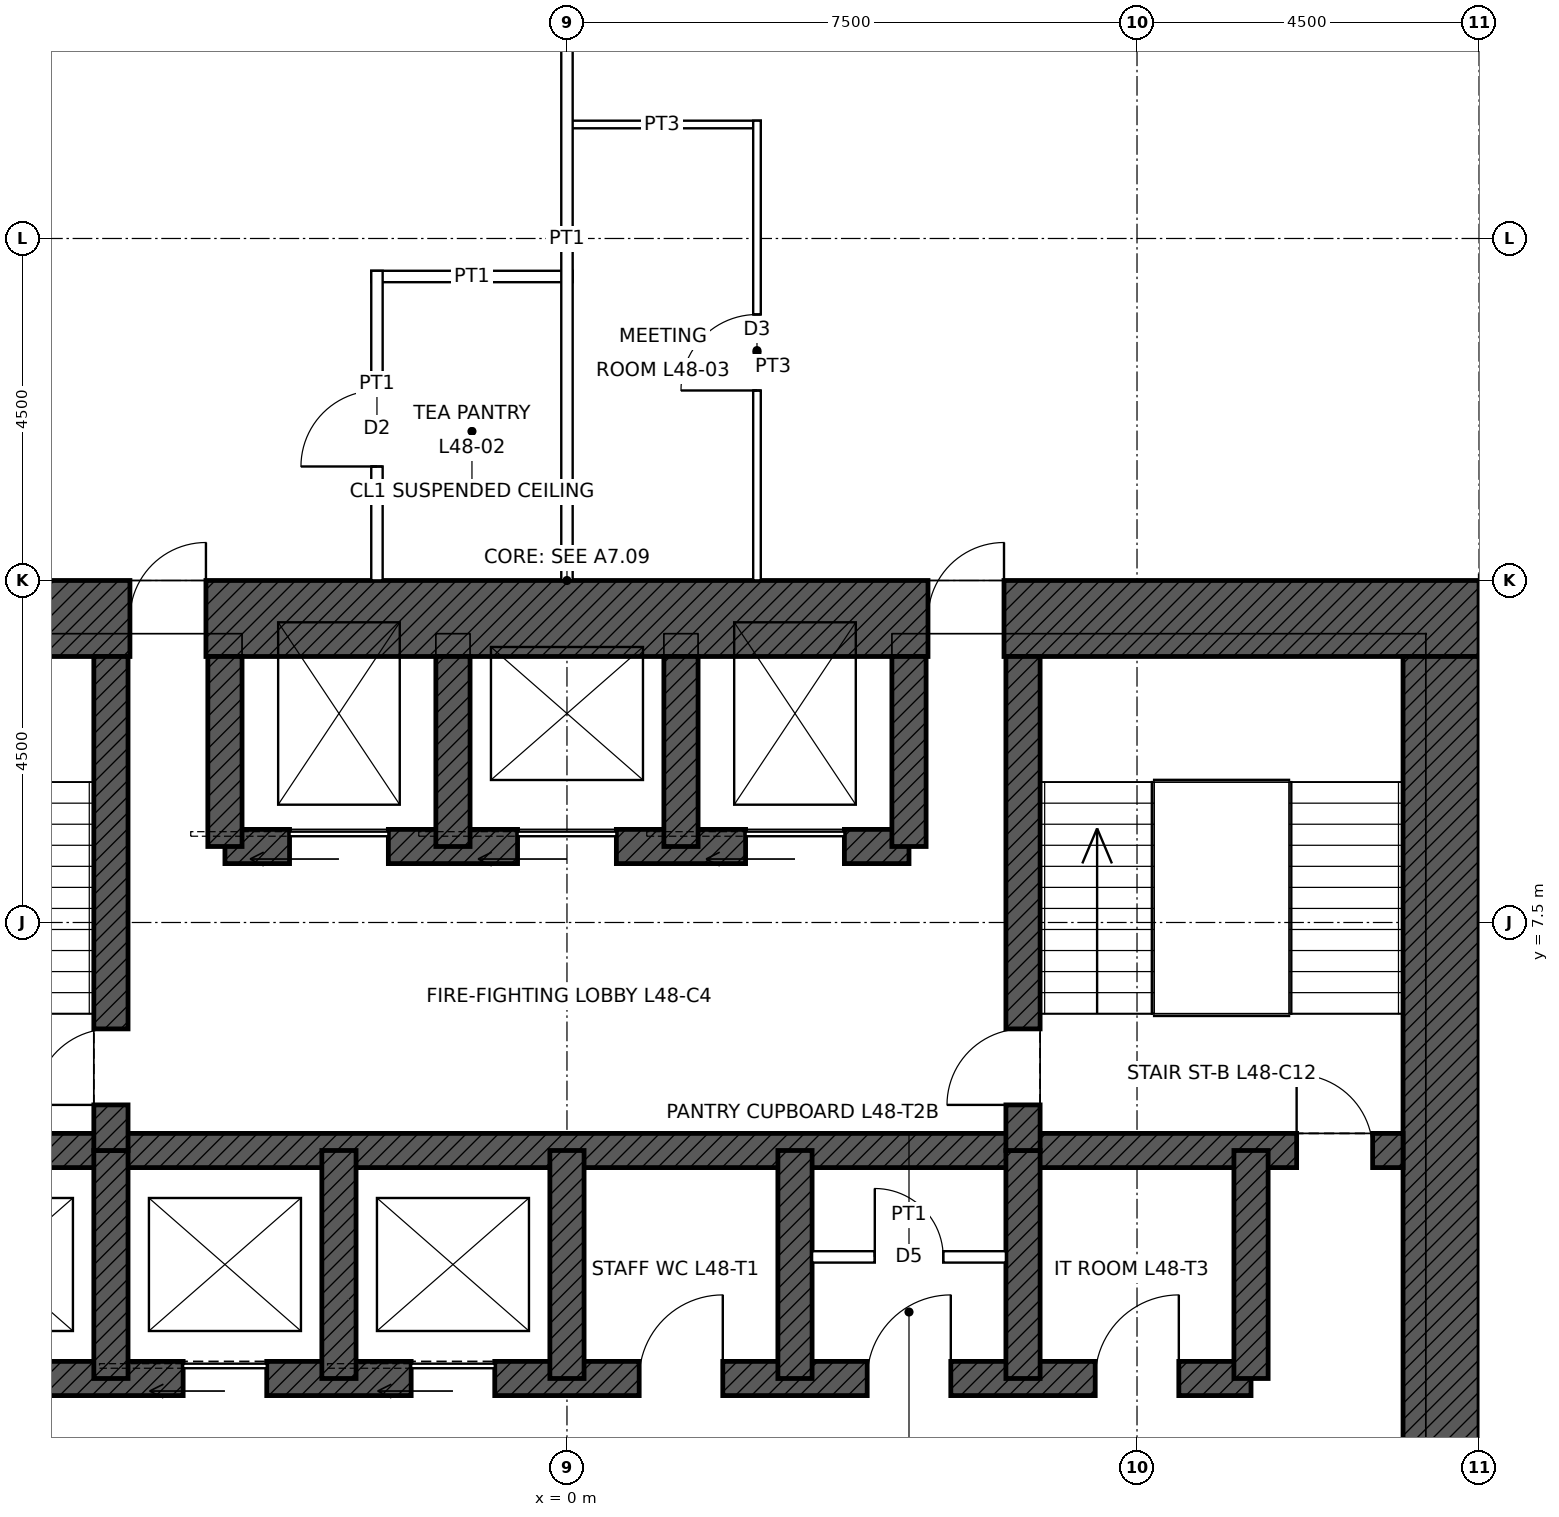
"""IFC4 building model, lengths in metres.
Left out: names, types, materials, properties, quantities, classifications, styles, units other than length and angle.
Written with IfcOpenShell. Run it as: python <this file> out.ifc"""

import sys

from ifc_helpers import new_model, si_unit, direction, frame, frame_2d, origin, place, context, subcontext, project, spatial, rectangle, extrude, element, fill, save


model = new_model("IFC4")
c1 = context("Model", 3, precision=1e-05, world=origin(), true_north=direction((0.0, 1.0)))
c2 = subcontext(c1, "Body", "Model", "MODEL_VIEW")
j1 = project(units=[si_unit("LENGTHUNIT", "METRE"), si_unit("PLANEANGLEUNIT", "RADIAN")], contexts=[c1])
p1 = place(None, origin())
s1 = spatial("IfcSite", under=j1, at=p1, CompositionType="ELEMENT")
p2 = place(p1, origin())
s2 = spatial("IfcBuilding", under=s1, at=p2, CompositionType="ELEMENT")
p3 = place(p2, frame((0.0, 0.0, 225.9)))
s3 = spatial("IfcBuildingStorey", under=s2, at=p3, CompositionType="ELEMENT", Elevation=225.9)
p4 = place(p3, frame((-12.0, 11.5, 0.0), z_axis=(0.0, 0.0, 1.0), x_axis=(1.0, 0.0, 0.0)))
e1 = element("IfcWall", 1, at=p4, inside=s3, PredefinedType="SHEAR", context=c2, shape_type="SweptSolid", body=[
    extrude(rectangle(XDim=24.0, YDim=1.0, at=frame_2d((12.0, 0.0))), origin(), (0.0, 0.0, 1.0), 4.0),
])
p5 = place(p4, frame((6.25, 0.0, 0.0)))
e2 = element("IfcOpeningElement", 2, at=p5, cuts=e1, PredefinedType="OPENING", context=c2, shape_type="SweptSolid", body=[
    extrude(rectangle(XDim=1.0, YDim=2.4, at=frame_2d((0.5, 1.2))), frame((0.0, 0.51, 0.0), z_axis=(0.0, -1.0, 0.0), x_axis=(1.0, 0.0, 0.0)), (0.0, 0.0, 1.0), 1.02),
])
p6 = place(p4, frame((16.75, 0.0, 0.0)))
e3 = element("IfcOpeningElement", 3, at=p6, cuts=e1, PredefinedType="OPENING", context=c2, shape_type="SweptSolid", body=[
    extrude(rectangle(XDim=1.0, YDim=2.4, at=frame_2d((0.5, 1.2))), frame((0.0, 0.51, 0.0), z_axis=(0.0, -1.0, 0.0), x_axis=(1.0, 0.0, 0.0)), (0.0, 0.0, 1.0), 1.02),
])
p7 = place(p3, frame((11.5, 11.0, 0.0), z_axis=(0.0, 0.0, 1.0), x_axis=(0.0, -1.0, 0.0)))
e4 = element("IfcWall", 4, at=p7, inside=s3, PredefinedType="SHEAR", context=c2, shape_type="SweptSolid", body=[
    extrude(rectangle(XDim=22.0, YDim=1.0, at=frame_2d((11.0, 0.0))), origin(), (0.0, 0.0, 1.0), 4.0),
])
p8 = place(p7, frame((10.5, 0.0, 0.0)))
e5 = element("IfcOpeningElement", 5, at=p8, cuts=e4, PredefinedType="OPENING", context=c2, shape_type="SweptSolid", body=[
    extrude(rectangle(XDim=1.0, YDim=2.4, at=frame_2d((0.5, 1.2))), frame((0.0, 0.51, 0.0), z_axis=(0.0, -1.0, 0.0), x_axis=(1.0, 0.0, 0.0)), (0.0, 0.0, 1.0), 1.02),
])
p9 = place(p3, frame((-11.0, 4.5, 0.0), z_axis=(0.0, 0.0, 1.0), x_axis=(1.0, 0.0, 0.0)))
e6 = element("IfcWall", 6, at=p9, inside=s3, PredefinedType="SHEAR", context=c2, shape_type="SweptSolid", body=[
    extrude(rectangle(XDim=22.0, YDim=0.45, at=frame_2d((11.0, 0.0))), origin(), (0.0, 0.0, 1.0), 4.0),
])
p10 = place(p9, frame((0.4, 0.0, 0.0)))
e7 = element("IfcOpeningElement", 7, at=p10, cuts=e6, PredefinedType="OPENING", context=c2, shape_type="SweptSolid", body=[
    extrude(rectangle(XDim=1.0, YDim=2.1, at=frame_2d((0.5, 1.05))), frame((0.0, 0.235, 0.0), z_axis=(0.0, -1.0, 0.0), x_axis=(1.0, 0.0, 0.0)), (0.0, 0.0, 1.0), 0.47),
])
p11 = place(p9, frame((20.6, 0.0, 0.0)))
e8 = element("IfcOpeningElement", 8, at=p11, cuts=e6, PredefinedType="OPENING", context=c2, shape_type="SweptSolid", body=[
    extrude(rectangle(XDim=1.0, YDim=2.1, at=frame_2d((0.5, 1.05))), frame((0.0, 0.235, 0.0), z_axis=(0.0, -1.0, 0.0), x_axis=(1.0, 0.0, 0.0)), (0.0, 0.0, 1.0), 0.47),
])
p12 = place(p3, frame((-9.0, 1.5, 0.0), z_axis=(0.0, 0.0, 1.0), x_axis=(1.0, 0.0, 0.0)))
e9 = element("IfcWall", 9, at=p12, inside=s3, PredefinedType="SHEAR", context=c2, shape_type="SweptSolid", body=[
    extrude(rectangle(XDim=18.0, YDim=0.45, at=frame_2d((9.0, 0.0))), origin(), (0.0, 0.0, 1.0), 4.0),
])
p13 = place(p12, frame((0.95, 0.0, 0.0)))
e10 = element("IfcOpeningElement", 10, at=p13, cuts=e9, PredefinedType="OPENING", context=c2, shape_type="SweptSolid", body=[
    extrude(rectangle(XDim=1.1, YDim=2.1, at=frame_2d((0.55, 1.05))), frame((0.0, 0.235, 0.0), z_axis=(0.0, -1.0, 0.0), x_axis=(1.0, 0.0, 0.0)), (0.0, 0.0, 1.0), 0.47),
])
p14 = place(p12, frame((3.95, 0.0, 0.0)))
e11 = element("IfcOpeningElement", 11, at=p14, cuts=e9, PredefinedType="OPENING", context=c2, shape_type="SweptSolid", body=[
    extrude(rectangle(XDim=1.1, YDim=2.1, at=frame_2d((0.55, 1.05))), frame((0.0, 0.235, 0.0), z_axis=(0.0, -1.0, 0.0), x_axis=(1.0, 0.0, 0.0)), (0.0, 0.0, 1.0), 0.47),
])
p15 = place(p12, frame((6.95, 0.0, 0.0)))
e12 = element("IfcOpeningElement", 12, at=p15, cuts=e9, PredefinedType="OPENING", context=c2, shape_type="SweptSolid", body=[
    extrude(rectangle(XDim=1.1, YDim=2.1, at=frame_2d((0.55, 1.05))), frame((0.0, 0.235, 0.0), z_axis=(0.0, -1.0, 0.0), x_axis=(1.0, 0.0, 0.0)), (0.0, 0.0, 1.0), 0.47),
])
p16 = place(p12, frame((9.95, 0.0, 0.0)))
e13 = element("IfcOpeningElement", 13, at=p16, cuts=e9, PredefinedType="OPENING", context=c2, shape_type="SweptSolid", body=[
    extrude(rectangle(XDim=1.1, YDim=2.1, at=frame_2d((0.55, 1.05))), frame((0.0, 0.235, 0.0), z_axis=(0.0, -1.0, 0.0), x_axis=(1.0, 0.0, 0.0)), (0.0, 0.0, 1.0), 0.47),
])
p17 = place(p12, frame((12.95, 0.0, 0.0)))
e14 = element("IfcOpeningElement", 14, at=p17, cuts=e9, PredefinedType="OPENING", context=c2, shape_type="SweptSolid", body=[
    extrude(rectangle(XDim=1.1, YDim=2.1, at=frame_2d((0.55, 1.05))), frame((0.0, 0.235, 0.0), z_axis=(0.0, -1.0, 0.0), x_axis=(1.0, 0.0, 0.0)), (0.0, 0.0, 1.0), 0.47),
])
p18 = place(p12, frame((15.95, 0.0, 0.0)))
e15 = element("IfcOpeningElement", 15, at=p18, cuts=e9, PredefinedType="OPENING", context=c2, shape_type="SweptSolid", body=[
    extrude(rectangle(XDim=1.1, YDim=2.1, at=frame_2d((0.55, 1.05))), frame((0.0, 0.235, 0.0), z_axis=(0.0, -1.0, 0.0), x_axis=(1.0, 0.0, 0.0)), (0.0, 0.0, 1.0), 0.47),
])
p19 = place(p3, frame((-4.5, 8.5, 0.0), z_axis=(0.0, 0.0, 1.0), x_axis=(1.0, 0.0, 0.0)))
e16 = element("IfcWall", 16, at=p19, inside=s3, PredefinedType="SHEAR", context=c2, shape_type="SweptSolid", body=[
    extrude(rectangle(XDim=9.0, YDim=0.45, at=frame_2d((4.5, 0.0))), origin(), (0.0, 0.0, 1.0), 4.0),
])
p20 = place(p19, frame((0.85, 0.0, 0.0)))
e17 = element("IfcOpeningElement", 17, at=p20, cuts=e16, PredefinedType="OPENING", context=c2, shape_type="SweptSolid", body=[
    extrude(rectangle(XDim=1.3, YDim=2.4, at=frame_2d((0.65, 1.2))), frame((0.0, 0.235, 0.0), z_axis=(0.0, -1.0, 0.0), x_axis=(1.0, 0.0, 0.0)), (0.0, 0.0, 1.0), 0.47),
])
p21 = place(p19, frame((6.85, 0.0, 0.0)))
e18 = element("IfcOpeningElement", 18, at=p21, cuts=e16, PredefinedType="OPENING", context=c2, shape_type="SweptSolid", body=[
    extrude(rectangle(XDim=1.3, YDim=2.4, at=frame_2d((0.65, 1.2))), frame((0.0, 0.235, 0.0), z_axis=(0.0, -1.0, 0.0), x_axis=(1.0, 0.0, 0.0)), (0.0, 0.0, 1.0), 0.47),
])
p22 = place(p19, frame((3.85, 0.0, 0.0)))
e19 = element("IfcOpeningElement", 19, at=p22, cuts=e16, PredefinedType="OPENING", context=c2, shape_type="SweptSolid", body=[
    extrude(rectangle(XDim=1.3, YDim=2.4, at=frame_2d((0.65, 1.2))), frame((0.0, 0.235, 0.0), z_axis=(0.0, -1.0, 0.0), x_axis=(1.0, 0.0, 0.0)), (0.0, 0.0, 1.0), 0.47),
])
for number, where, z_axis, x_axis in (
    (20, (9.0, 1.5, 0.0), (0.0, 0.0, 1.0), (0.0, 1.0, 0.0)),
    (21, (-6.0, 1.5, 0.0), (0.0, 0.0, 1.0), (0.0, 1.0, 0.0)),
    (22, (-3.0, 1.5, 0.0), (0.0, 0.0, 1.0), (0.0, 1.0, 0.0)),
    (23, (0.0, 1.5, 0.0), (0.0, 0.0, 1.0), (0.0, 1.0, 0.0)),
    (24, (3.0, 1.5, 0.0), (0.0, 0.0, 1.0), (0.0, 1.0, 0.0)),
    (25, (6.0, 1.5, 0.0), (0.0, 0.0, 1.0), (0.0, 1.0, 0.0)),
):
    element("IfcWall", number, at=place(p3, frame(where, z_axis=z_axis, x_axis=x_axis)), inside=s3, PredefinedType="SHEAR", context=c2, shape_type="SweptSolid", body=[
        extrude(rectangle(XDim=3.0, YDim=0.45, at=frame_2d((1.5, 0.0))), origin(), (0.0, 0.0, 1.0), 4.0),
    ])
p23 = place(p3, frame((-6.0, 4.5, 0.0), z_axis=(0.0, 0.0, 1.0), x_axis=(0.0, 1.0, 0.0)))
e26 = element("IfcWall", 26, at=p23, inside=s3, PredefinedType="SHEAR", context=c2, shape_type="SweptSolid", body=[
    extrude(rectangle(XDim=6.5, YDim=0.45, at=frame_2d((3.25, 0.0))), origin(), (0.0, 0.0, 1.0), 4.0),
])
p24 = place(p23, frame((0.6, 0.0, 0.0)))
e27 = element("IfcOpeningElement", 27, at=p24, cuts=e26, PredefinedType="OPENING", context=c2, shape_type="SweptSolid", body=[
    extrude(rectangle(XDim=1.0, YDim=2.1, at=frame_2d((0.5, 1.05))), frame((0.0, 0.235, 0.0), z_axis=(0.0, -1.0, 0.0), x_axis=(1.0, 0.0, 0.0)), (0.0, 0.0, 1.0), 0.47),
])
p25 = place(p3, frame((6.0, 4.5, 0.0), z_axis=(0.0, 0.0, 1.0), x_axis=(0.0, 1.0, 0.0)))
e28 = element("IfcWall", 28, at=p25, inside=s3, PredefinedType="SHEAR", context=c2, shape_type="SweptSolid", body=[
    extrude(rectangle(XDim=6.5, YDim=0.45, at=frame_2d((3.25, 0.0))), origin(), (0.0, 0.0, 1.0), 4.0),
])
p26 = place(p25, frame((0.6, 0.0, 0.0)))
e29 = element("IfcOpeningElement", 29, at=p26, cuts=e28, PredefinedType="OPENING", context=c2, shape_type="SweptSolid", body=[
    extrude(rectangle(XDim=1.0, YDim=2.1, at=frame_2d((0.5, 1.05))), frame((0.0, 0.235, 0.0), z_axis=(0.0, -1.0, 0.0), x_axis=(1.0, 0.0, 0.0)), (0.0, 0.0, 1.0), 0.47),
])
for number, where, z_axis, x_axis in (
    (30, (-4.5, 8.5, 0.0), (0.0, 0.0, 1.0), (0.0, 1.0, 0.0)),
    (31, (4.5, 8.5, 0.0), (0.0, 0.0, 1.0), (0.0, 1.0, 0.0)),
    (32, (-1.5, 8.5, 0.0), (0.0, 0.0, 1.0), (0.0, 1.0, 0.0)),
    (33, (1.5, 8.5, 0.0), (0.0, 0.0, 1.0), (0.0, 1.0, 0.0)),
):
    element("IfcWall", number, at=place(p3, frame(where, z_axis=z_axis, x_axis=x_axis)), inside=s3, PredefinedType="SHEAR", context=c2, shape_type="SweptSolid", body=[
        extrude(rectangle(XDim=2.5, YDim=0.45, at=frame_2d((1.25, 0.0))), origin(), (0.0, 0.0, 1.0), 4.0),
    ])
p27 = place(p3, frame((-2.575, 16.0, 0.0), z_axis=(0.0, 0.0, 1.0), x_axis=(1.0, 0.0, 0.0)))
e34 = element("IfcWall", 34, at=p27, inside=s3, PredefinedType="PARTITIONING", context=c2, shape_type="SweptSolid", body=[
    extrude(rectangle(XDim=2.65, YDim=0.15, at=frame_2d((1.325, 0.0))), origin(), (0.0, 0.0, 1.0), 3.85),
])
p28 = place(p3, frame((-0.05, 18.0, 0.0), z_axis=(0.0, 0.0, 1.0), x_axis=(1.0, 0.0, 0.0)))
e35 = element("IfcWall", 35, at=p28, inside=s3, PredefinedType="PARTITIONING", context=c2, shape_type="SweptSolid", body=[
    extrude(rectangle(XDim=2.6, YDim=0.1, at=frame_2d((1.3, 0.0))), origin(), (0.0, 0.0, 1.0), 3.85),
])
p29 = place(p3, frame((-2.5, 12.0, 0.0), z_axis=(0.0, 0.0, 1.0), x_axis=(0.0, 1.0, 0.0)))
e36 = element("IfcWall", 36, at=p29, inside=s3, PredefinedType="PARTITIONING", context=c2, shape_type="SweptSolid", body=[
    extrude(rectangle(XDim=4.075, YDim=0.15, at=frame_2d((2.038, 0.0))), origin(), (0.0, 0.0, 1.0), 3.85),
])
p30 = place(p29, frame((1.5, 0.0, 0.0)))
e37 = element("IfcOpeningElement", 37, at=p30, cuts=e36, PredefinedType="OPENING", context=c2, shape_type="SweptSolid", body=[
    extrude(rectangle(XDim=1.0, YDim=2.1, at=frame_2d((0.5, 1.05))), frame((0.0, 0.085, 0.0), z_axis=(0.0, -1.0, 0.0), x_axis=(1.0, 0.0, 0.0)), (0.0, 0.0, 1.0), 0.17),
])
p31 = place(p3, frame((0.0, 12.0, 0.0), z_axis=(0.0, 0.0, 1.0), x_axis=(0.0, 1.0, 0.0)))
e38 = element("IfcWall", 38, at=p31, inside=s3, PredefinedType="PARTITIONING", context=c2, shape_type="SweptSolid", body=[
    extrude(rectangle(XDim=8.99, YDim=0.15, at=frame_2d((4.495, 0.0))), origin(), (0.0, 0.0, 1.0), 3.238),
])
p32 = place(p3, frame((2.5, 12.0, 0.0), z_axis=(0.0, 0.0, 1.0), x_axis=(0.0, 1.0, 0.0)))
e39 = element("IfcWall", 39, at=p32, inside=s3, PredefinedType="PARTITIONING", context=c2, shape_type="SweptSolid", body=[
    extrude(rectangle(XDim=6.05, YDim=0.1, at=frame_2d((3.025, 0.0))), origin(), (0.0, 0.0, 1.0), 3.85),
])
p33 = place(p32, frame((2.5, 0.0, 0.0)))
e40 = element("IfcOpeningElement", 40, at=p33, cuts=e39, PredefinedType="OPENING", context=c2, shape_type="SweptSolid", body=[
    extrude(rectangle(XDim=1.0, YDim=2.1, at=frame_2d((0.5, 1.05))), frame((0.0, 0.06, 0.0), z_axis=(0.0, -1.0, 0.0), x_axis=(1.0, 0.0, 0.0)), (0.0, 0.0, 1.0), 0.12),
])
p34 = place(p3, frame((3.225, 3.1, 0.0), z_axis=(0.0, 0.0, 1.0), x_axis=(1.0, 0.0, 0.0)))
e41 = element("IfcWall", 41, at=p34, inside=s3, PredefinedType="PARTITIONING", context=c2, shape_type="SweptSolid", body=[
    extrude(rectangle(XDim=2.55, YDim=0.15, at=frame_2d((1.275, 0.0))), origin(), (0.0, 0.0, 1.0), 3.75),
])
p35 = place(p34, frame((0.825, 0.0, 0.0)))
e42 = element("IfcOpeningElement", 42, at=p35, cuts=e41, PredefinedType="OPENING", context=c2, shape_type="SweptSolid", body=[
    extrude(rectangle(XDim=0.9, YDim=2.1, at=frame_2d((0.45, 1.05))), frame((0.0, 0.085, 0.0), z_axis=(0.0, -1.0, 0.0), x_axis=(1.0, 0.0, 0.0)), (0.0, 0.0, 1.0), 0.17),
])
p36 = place(p11, origin())
e43 = element("IfcDoor", 43, at=p36, inside=s3, OperationType="SINGLE_SWING_LEFT", PredefinedType="DOOR", context=c2, shape_type="SweptSolid", body=[
    extrude(rectangle(XDim=1.0, YDim=2.1, at=frame_2d((0.5, 1.05))), frame((0.0, 0.025, 0.0), z_axis=(0.0, -1.0, 0.0), x_axis=(1.0, 0.0, 0.0)), (0.0, 0.0, 1.0), 0.05),
])
fill(e8, e43)
p37 = place(p24, origin())
e44 = element("IfcDoor", 44, at=p37, inside=s3, OperationType="SINGLE_SWING_LEFT", PredefinedType="DOOR", context=c2, shape_type="SweptSolid", body=[
    extrude(rectangle(XDim=1.0, YDim=2.1, at=frame_2d((0.5, 1.05))), frame((0.0, 0.025, 0.0), z_axis=(0.0, -1.0, 0.0), x_axis=(1.0, 0.0, 0.0)), (0.0, 0.0, 1.0), 0.05),
])
fill(e27, e44)
p38 = place(p26, origin())
e45 = element("IfcDoor", 45, at=p38, inside=s3, OperationType="SINGLE_SWING_LEFT", PredefinedType="DOOR", context=c2, shape_type="SweptSolid", body=[
    extrude(rectangle(XDim=1.0, YDim=2.1, at=frame_2d((0.5, 1.05))), frame((0.0, 0.025, 0.0), z_axis=(0.0, -1.0, 0.0), x_axis=(1.0, 0.0, 0.0)), (0.0, 0.0, 1.0), 0.05),
])
fill(e29, e45)
p39 = place(p5, origin())
e46 = element("IfcDoor", 46, at=p39, inside=s3, OperationType="SINGLE_SWING_RIGHT", PredefinedType="DOOR", context=c2, shape_type="SweptSolid", body=[
    extrude(rectangle(XDim=1.0, YDim=2.4, at=frame_2d((0.5, 1.2))), frame((0.0, 0.485, 0.0), z_axis=(0.0, -1.0, 0.0), x_axis=(1.0, 0.0, 0.0)), (0.0, 0.0, 1.0), 0.05),
])
fill(e2, e46)
p40 = place(p6, origin())
e47 = element("IfcDoor", 47, at=p40, inside=s3, OperationType="SINGLE_SWING_RIGHT", PredefinedType="DOOR", context=c2, shape_type="SweptSolid", body=[
    extrude(rectangle(XDim=1.0, YDim=2.4, at=frame_2d((0.5, 1.2))), frame((0.0, 0.485, 0.0), z_axis=(0.0, -1.0, 0.0), x_axis=(1.0, 0.0, 0.0)), (0.0, 0.0, 1.0), 0.05),
])
fill(e3, e47)
p41 = place(p20, origin())
e48 = element("IfcDoor", 48, at=p41, inside=s3, OperationType="SLIDING_TO_LEFT", PredefinedType="DOOR", context=c2, shape_type="SweptSolid", body=[
    extrude(rectangle(XDim=1.3, YDim=2.4, at=frame_2d((0.65, 1.2))), frame((0.0, 0.025, 0.0), z_axis=(0.0, -1.0, 0.0), x_axis=(1.0, 0.0, 0.0)), (0.0, 0.0, 1.0), 0.05),
])
fill(e17, e48)
p42 = place(p21, origin())
e49 = element("IfcDoor", 49, at=p42, inside=s3, OperationType="SLIDING_TO_LEFT", PredefinedType="DOOR", context=c2, shape_type="SweptSolid", body=[
    extrude(rectangle(XDim=1.3, YDim=2.4, at=frame_2d((0.65, 1.2))), frame((0.0, 0.025, 0.0), z_axis=(0.0, -1.0, 0.0), x_axis=(1.0, 0.0, 0.0)), (0.0, 0.0, 1.0), 0.05),
])
fill(e18, e49)
p43 = place(p22, origin())
e50 = element("IfcDoor", 50, at=p43, inside=s3, OperationType="SLIDING_TO_LEFT", PredefinedType="DOOR", context=c2, shape_type="SweptSolid", body=[
    extrude(rectangle(XDim=1.3, YDim=2.4, at=frame_2d((0.65, 1.2))), frame((0.0, 0.025, 0.0), z_axis=(0.0, -1.0, 0.0), x_axis=(1.0, 0.0, 0.0)), (0.0, 0.0, 1.0), 0.05),
])
fill(e19, e50)
p44 = place(p14, origin())
e51 = element("IfcDoor", 51, at=p44, inside=s3, OperationType="SLIDING_TO_LEFT", PredefinedType="DOOR", context=c2, shape_type="SweptSolid", body=[
    extrude(rectangle(XDim=1.1, YDim=2.1, at=frame_2d((0.55, 1.05))), frame((0.0, 0.025, 0.0), z_axis=(0.0, -1.0, 0.0), x_axis=(1.0, 0.0, 0.0)), (0.0, 0.0, 1.0), 0.05),
])
fill(e11, e51)
p45 = place(p15, origin())
e52 = element("IfcDoor", 52, at=p45, inside=s3, OperationType="SLIDING_TO_LEFT", PredefinedType="DOOR", context=c2, shape_type="SweptSolid", body=[
    extrude(rectangle(XDim=1.1, YDim=2.1, at=frame_2d((0.55, 1.05))), frame((0.0, 0.025, 0.0), z_axis=(0.0, -1.0, 0.0), x_axis=(1.0, 0.0, 0.0)), (0.0, 0.0, 1.0), 0.05),
])
fill(e12, e52)
p46 = place(p16, origin())
e53 = element("IfcDoor", 53, at=p46, inside=s3, OperationType="SINGLE_SWING_RIGHT", PredefinedType="DOOR", context=c2, shape_type="SweptSolid", body=[
    extrude(rectangle(XDim=1.1, YDim=2.1, at=frame_2d((0.55, 1.05))), frame((0.0, 0.025, 0.0), z_axis=(0.0, -1.0, 0.0), x_axis=(1.0, 0.0, 0.0)), (0.0, 0.0, 1.0), 0.05),
])
fill(e13, e53)
p47 = place(p17, origin())
e54 = element("IfcDoor", 54, at=p47, inside=s3, OperationType="SINGLE_SWING_RIGHT", PredefinedType="DOOR", context=c2, shape_type="SweptSolid", body=[
    extrude(rectangle(XDim=1.1, YDim=2.1, at=frame_2d((0.55, 1.05))), frame((0.0, 0.025, 0.0), z_axis=(0.0, -1.0, 0.0), x_axis=(1.0, 0.0, 0.0)), (0.0, 0.0, 1.0), 0.05),
])
fill(e14, e54)
p48 = place(p35, origin())
e55 = element("IfcDoor", 55, at=p48, inside=s3, OperationType="SINGLE_SWING_LEFT", PredefinedType="DOOR", context=c2, shape_type="SweptSolid", body=[
    extrude(rectangle(XDim=0.9, YDim=2.1, at=frame_2d((0.45, 1.05))), frame((0.0, 0.025, 0.0), z_axis=(0.0, -1.0, 0.0), x_axis=(1.0, 0.0, 0.0)), (0.0, 0.0, 1.0), 0.05),
])
fill(e42, e55)
p49 = place(p18, origin())
e56 = element("IfcDoor", 56, at=p49, inside=s3, OperationType="SINGLE_SWING_RIGHT", PredefinedType="DOOR", context=c2, shape_type="SweptSolid", body=[
    extrude(rectangle(XDim=1.1, YDim=2.1, at=frame_2d((0.55, 1.05))), frame((0.0, 0.025, 0.0), z_axis=(0.0, -1.0, 0.0), x_axis=(1.0, 0.0, 0.0)), (0.0, 0.0, 1.0), 0.05),
])
fill(e15, e56)
p50 = place(p30, origin())
e57 = element("IfcDoor", 57, at=p50, inside=s3, OperationType="SINGLE_SWING_LEFT", PredefinedType="DOOR", context=c2, shape_type="SweptSolid", body=[
    extrude(rectangle(XDim=1.0, YDim=2.1, at=frame_2d((0.5, 1.05))), frame((0.0, 0.025, 0.0), z_axis=(0.0, -1.0, 0.0), x_axis=(1.0, 0.0, 0.0)), (0.0, 0.0, 1.0), 0.05),
])
fill(e37, e57)
p51 = place(p33, origin())
e58 = element("IfcDoor", 58, at=p51, inside=s3, OperationType="SINGLE_SWING_LEFT", PredefinedType="DOOR", context=c2, shape_type="SweptSolid", body=[
    extrude(rectangle(XDim=1.0, YDim=2.1, at=frame_2d((0.5, 1.05))), frame((0.0, 0.025, 0.0), z_axis=(0.0, -1.0, 0.0), x_axis=(1.0, 0.0, 0.0)), (0.0, 0.0, 1.0), 0.05),
])
fill(e40, e58)
save(model, sys.argv[1])
